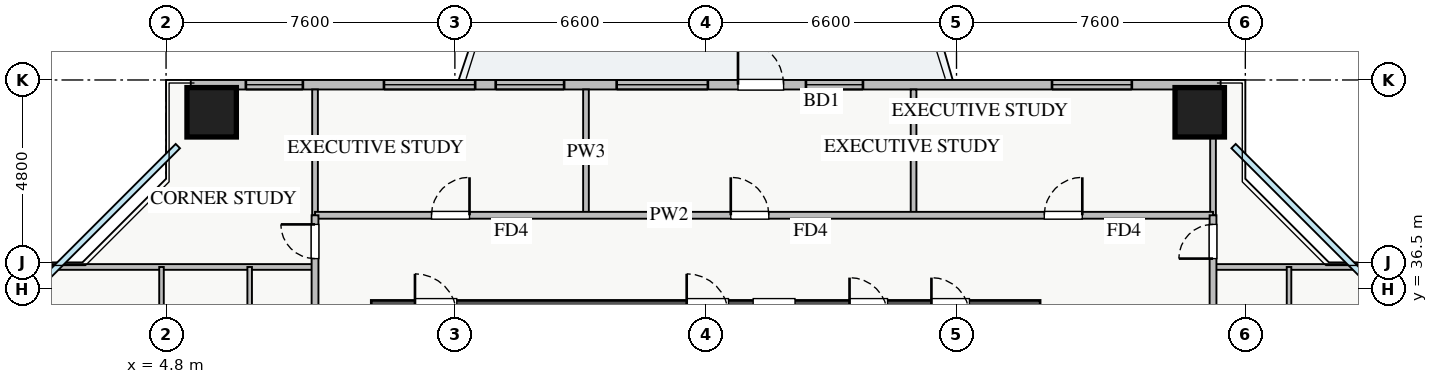
"""IFC4 building model, lengths in metres.
Left out: names, types, materials, properties, quantities, classifications, styles, units other than length and angle.
Written with IfcOpenShell. Run it as: python <this file> out.ifc"""

import sys

from ifc_helpers import new_model, si_unit, direction, frame, frame_2d, origin, origin_2d, place, context, subcontext, project, spatial, rectangle, extrude, source, transform, mapped, element, fill, save


model = new_model("IFC4")
c1 = context("Model", 3, precision=1e-05, world=origin(), true_north=direction((0.0, 1.0)))
c2 = subcontext(c1, "Body", "Model", "MODEL_VIEW")
j1 = project(units=[si_unit("LENGTHUNIT", "METRE"), si_unit("PLANEANGLEUNIT", "RADIAN")], contexts=[c1])
p1 = place(None, origin())
s1 = spatial("IfcSite", under=j1, at=p1, CompositionType="ELEMENT")
p2 = place(p1, origin())
s2 = spatial("IfcBuilding", under=s1, at=p2, CompositionType="ELEMENT")
p3 = place(p2, frame((0.0, 0.0, 86.0)))
s3 = spatial("IfcBuildingStorey", under=s2, at=p3, CompositionType="ELEMENT", Elevation=86.0)
p4 = place(p3, frame((10.2, 35.8, 0.0), z_axis=(0.0, 0.0, 1.0), x_axis=(1.0, 0.0, 0.0)))
e1 = element("IfcWall", 1, at=p4, inside=s3, PredefinedType="SHEAR", context=c2, shape_type="SweptSolid", body=[
    extrude(rectangle(XDim=17.6, YDim=0.8, at=frame_2d((8.8, 0.0))), origin(), (0.0, 0.0, 1.0), 3.25),
])
p5 = place(p4, frame((1.15, 0.0, 0.0)))
e2 = element("IfcOpeningElement", 2, at=p5, cuts=e1, PredefinedType="OPENING", context=c2, shape_type="SweptSolid", body=[
    extrude(rectangle(XDim=1.1, YDim=2.05, at=frame_2d((0.55, 1.025))), frame((0.0, 0.41, 0.0), z_axis=(0.0, -1.0, 0.0), x_axis=(1.0, 0.0, 0.0)), (0.0, 0.0, 1.0), 0.82),
])
p6 = place(p4, frame((8.3, 0.0, 0.0)))
e3 = element("IfcOpeningElement", 3, at=p6, cuts=e1, PredefinedType="OPENING", context=c2, shape_type="SweptSolid", body=[
    extrude(rectangle(XDim=1.1, YDim=2.05, at=frame_2d((0.55, 1.025))), frame((0.0, 0.41, 0.0), z_axis=(0.0, -1.0, 0.0), x_axis=(1.0, 0.0, 0.0)), (0.0, 0.0, 1.0), 0.82),
])
p7 = place(p4, frame((10.05, 0.0, 0.0)))
e4 = element("IfcOpeningElement", 4, at=p7, cuts=e1, PredefinedType="OPENING", context=c2, shape_type="SweptSolid", body=[
    extrude(rectangle(XDim=1.1, YDim=2.05, at=frame_2d((0.55, 1.025))), frame((0.0, 0.41, 0.0), z_axis=(0.0, -1.0, 0.0), x_axis=(1.0, 0.0, 0.0)), (0.0, 0.0, 1.0), 0.82),
])
p8 = place(p4, frame((14.74, 0.0, 0.0)))
e5 = element("IfcOpeningElement", 5, at=p8, cuts=e1, PredefinedType="OPENING", context=c2, shape_type="SweptSolid", body=[
    extrude(rectangle(XDim=1.0, YDim=2.05, at=frame_2d((0.5, 1.025))), frame((0.0, 0.41, 0.0), z_axis=(0.0, -1.0, 0.0), x_axis=(1.0, 0.0, 0.0)), (0.0, 0.0, 1.0), 0.82),
])
p9 = place(p4, frame((12.585, 0.0, 0.0)))
e6 = element("IfcOpeningElement", 6, at=p9, cuts=e1, PredefinedType="OPENING", context=c2, shape_type="SweptSolid", body=[
    extrude(rectangle(XDim=1.0, YDim=2.05, at=frame_2d((0.5, 1.025))), frame((0.0, 0.41, 0.0), z_axis=(0.0, -1.0, 0.0), x_axis=(1.0, 0.0, 0.0)), (0.0, 0.0, 1.0), 0.82),
])
m1 = source(origin(), c2, "Body", "SweptSolid", [
    extrude(rectangle(XDim=1.3, YDim=1.3, at=origin_2d()), origin(), (0.0, 0.0, 1.0), 3.25),
])
for number, where, z_axis, x_axis in (
    (7, (32.0, 41.15, 0.0), (0.0, 0.0, 1.0), (1.0, 0.0, 0.0)),
    (8, (6.0, 41.15, 0.0), (0.0, 0.0, 1.0), (1.0, 0.0, 0.0)),
):
    element("IfcColumn", number, at=place(p3, frame(where, z_axis=z_axis, x_axis=x_axis)), inside=s3, PredefinedType="COLUMN", context=c2, shape_type="MappedRepresentation", body=[
        mapped(m1, transform((0.0, 0.0, 0.0), x_axis=(1.0, 0.0, 0.0), y_axis=(0.0, 1.0, 0.0), z_axis=(0.0, 0.0, 1.0), scale=1.0)),
    ])
p10 = place(p3, frame((5.45, 41.875, 0.0), z_axis=(0.0, 0.0, 1.0), x_axis=(1.0, 0.0, 0.0)))
e9 = element("IfcWall", 9, at=p10, inside=s3, PredefinedType="STANDARD", context=c2, shape_type="SweptSolid", body=[
    extrude(rectangle(XDim=27.1, YDim=0.25, at=frame_2d((13.55, 0.0))), origin(), (0.0, 0.0, 1.0), 2.61),
])
p11 = place(p10, frame((14.4, 0.0, 0.0)))
e10 = element("IfcOpeningElement", 10, at=p11, cuts=e9, PredefinedType="OPENING", context=c2, shape_type="SweptSolid", body=[
    extrude(rectangle(XDim=1.2, YDim=2.1, at=frame_2d((0.6, 1.05))), frame((0.0, 0.135, 0.0), z_axis=(0.0, -1.0, 0.0), x_axis=(1.0, 0.0, 0.0)), (0.0, 0.0, 1.0), 0.27),
])
p12 = place(p10, frame((1.45, 0.0, 0.9)))
e11 = element("IfcOpeningElement", 11, at=p12, cuts=e9, PredefinedType="OPENING", context=c2, shape_type="SweptSolid", body=[
    extrude(rectangle(XDim=1.5, YDim=1.5, at=frame_2d((0.75, 0.75))), frame((0.0, 0.135, 0.0), z_axis=(0.0, -1.0, 0.0), x_axis=(1.0, 0.0, 0.0)), (0.0, 0.0, 1.0), 0.27),
])
p13 = place(p10, frame((8.024, 0.0, 0.9)))
e12 = element("IfcOpeningElement", 12, at=p13, cuts=e9, PredefinedType="OPENING", context=c2, shape_type="SweptSolid", body=[
    extrude(rectangle(XDim=1.8, YDim=1.5, at=frame_2d((0.9, 0.75))), frame((0.0, 0.135, 0.0), z_axis=(0.0, -1.0, 0.0), x_axis=(1.0, 0.0, 0.0)), (0.0, 0.0, 1.0), 0.27),
])
p14 = place(p10, frame((16.188, 0.0, 0.9)))
e13 = element("IfcOpeningElement", 13, at=p14, cuts=e9, PredefinedType="OPENING", context=c2, shape_type="SweptSolid", body=[
    extrude(rectangle(XDim=1.5, YDim=1.45, at=frame_2d((0.75, 0.725))), frame((0.0, 0.135, 0.0), z_axis=(0.0, -1.0, 0.0), x_axis=(1.0, 0.0, 0.0)), (0.0, 0.0, 1.0), 0.27),
])
p15 = place(p10, frame((22.663, 0.0, 0.9)))
e14 = element("IfcOpeningElement", 14, at=p15, cuts=e9, PredefinedType="OPENING", context=c2, shape_type="SweptSolid", body=[
    extrude(rectangle(XDim=2.1, YDim=1.48, at=frame_2d((1.05, 0.74))), frame((0.0, 0.135, 0.0), z_axis=(0.0, -1.0, 0.0), x_axis=(1.0, 0.0, 0.0)), (0.0, 0.0, 1.0), 0.27),
])
p16 = place(p10, frame((5.084, 0.0, 0.9)))
e15 = element("IfcOpeningElement", 15, at=p16, cuts=e9, PredefinedType="OPENING", context=c2, shape_type="SweptSolid", body=[
    extrude(rectangle(XDim=2.4, YDim=1.5, at=frame_2d((1.2, 0.75))), frame((0.0, 0.135, 0.0), z_axis=(0.0, -1.0, 0.0), x_axis=(1.0, 0.0, 0.0)), (0.0, 0.0, 1.0), 0.27),
])
p17 = place(p10, frame((11.208, 0.0, 0.9)))
e16 = element("IfcOpeningElement", 16, at=p17, cuts=e9, PredefinedType="OPENING", context=c2, shape_type="SweptSolid", body=[
    extrude(rectangle(XDim=2.4, YDim=1.5, at=frame_2d((1.2, 0.75))), frame((0.0, 0.135, 0.0), z_axis=(0.0, -1.0, 0.0), x_axis=(1.0, 0.0, 0.0)), (0.0, 0.0, 1.0), 0.27),
])
p18 = place(p3, frame((15.85, 38.44, 0.0), z_axis=(0.0, 0.0, 1.0), x_axis=(0.0, 1.0, 0.0)))
e17 = element("IfcWall", 17, at=p18, inside=s3, PredefinedType="PARTITIONING", context=c2, shape_type="SweptSolid", body=[
    extrude(rectangle(XDim=3.31, YDim=0.15, at=frame_2d((1.655, 0.0))), origin(), (0.0, 0.0, 1.0), 2.715),
])
for number, where, z_axis, x_axis in (
    (18, (24.47, 38.44, 0.0), (0.0, 0.0, 1.0), (0.0, 1.0, 0.0)),
    (19, (8.72, 38.44, 0.0), (0.0, 0.0, 1.0), (0.0, 1.0, 0.0)),
    (20, (32.35, 38.44, 0.0), (0.0, 0.0, 1.0), (0.0, 1.0, 0.0)),
):
    element("IfcWall", number, at=place(p3, frame(where, z_axis=z_axis, x_axis=x_axis)), inside=s3, PredefinedType="PARTITIONING", context=c2, shape_type="SweptSolid", body=[
        extrude(rectangle(XDim=3.31, YDim=0.15, at=frame_2d((1.655, 0.0))), origin(), (0.0, 0.0, 1.0), 3.07),
    ])
p19 = place(p3, frame((8.72, 38.44, 0.0), z_axis=(0.0, 0.0, 1.0), x_axis=(1.0, 0.0, 0.0)))
e21 = element("IfcWall", 21, at=p19, inside=s3, PredefinedType="PARTITIONING", context=c2, shape_type="SweptSolid", body=[
    extrude(rectangle(XDim=23.63, YDim=0.18, at=frame_2d((11.815, 0.0))), origin(), (0.0, 0.0, 1.0), 3.07),
])
p20 = place(p19, frame((3.065, 0.0, 0.0)))
e22 = element("IfcOpeningElement", 22, at=p20, cuts=e21, PredefinedType="OPENING", context=c2, shape_type="SweptSolid", body=[
    extrude(rectangle(XDim=1.0, YDim=2.05, at=frame_2d((0.5, 1.025))), frame((0.0, 0.1, 0.0), z_axis=(0.0, -1.0, 0.0), x_axis=(1.0, 0.0, 0.0)), (0.0, 0.0, 1.0), 0.2),
])
p21 = place(p19, frame((10.94, 0.0, 0.0)))
e23 = element("IfcOpeningElement", 23, at=p21, cuts=e21, PredefinedType="OPENING", context=c2, shape_type="SweptSolid", body=[
    extrude(rectangle(XDim=1.0, YDim=2.05, at=frame_2d((0.5, 1.025))), frame((0.0, 0.1, 0.0), z_axis=(0.0, -1.0, 0.0), x_axis=(1.0, 0.0, 0.0)), (0.0, 0.0, 1.0), 0.2),
])
p22 = place(p19, frame((19.19, 0.0, 0.0)))
e24 = element("IfcOpeningElement", 24, at=p22, cuts=e21, PredefinedType="OPENING", context=c2, shape_type="SweptSolid", body=[
    extrude(rectangle(XDim=1.0, YDim=2.05, at=frame_2d((0.5, 1.025))), frame((0.0, 0.1, 0.0), z_axis=(0.0, -1.0, 0.0), x_axis=(1.0, 0.0, 0.0)), (0.0, 0.0, 1.0), 0.2),
])
p23 = place(p3, frame((0.25, 37.08, 0.0), z_axis=(0.0, 0.0, 1.0), x_axis=(1.0, 0.0, 0.0)))
e25 = element("IfcWall", 25, at=p23, inside=s3, PredefinedType="PARTITIONING", context=c2, shape_type="SweptSolid", body=[
    extrude(rectangle(XDim=8.47, YDim=0.15, at=frame_2d((4.235, 0.0))), origin(), (0.0, 0.0, 1.0), 3.07),
])
for number, where, z_axis, x_axis in (
    (26, (4.68, 32.14, 0.0), (0.0, 0.0, 1.0), (0.0, 1.0, 0.0)),
    (27, (7.0, 32.14, 0.0), (0.0, 0.0, 1.0), (0.0, 1.0, 0.0)),
):
    element("IfcWall", number, at=place(p3, frame(where, z_axis=z_axis, x_axis=x_axis)), inside=s3, PredefinedType="PLUMBINGWALL", context=c2, shape_type="SweptSolid", body=[
        extrude(rectangle(XDim=4.94, YDim=0.12, at=frame_2d((2.47, 0.0))), origin(), (0.0, 0.0, 1.0), 3.07),
    ])
p24 = place(p3, frame((8.72, 7.21, 0.0), z_axis=(0.0, 0.0, 1.0), x_axis=(0.0, 1.0, 0.0)))
e28 = element("IfcWall", 28, at=p24, inside=s3, PredefinedType="PARTITIONING", context=c2, shape_type="SweptSolid", body=[
    extrude(rectangle(XDim=31.23, YDim=0.18, at=frame_2d((15.615, 0.0))), origin(), (0.0, 0.0, 1.0), 3.07),
])
p25 = place(p24, frame((30.09, 0.0, 0.0)))
e29 = element("IfcOpeningElement", 29, at=p25, cuts=e28, PredefinedType="OPENING", context=c2, shape_type="SweptSolid", body=[
    extrude(rectangle(XDim=0.9, YDim=2.05, at=frame_2d((0.45, 1.025))), frame((0.0, 0.1, 0.0), z_axis=(0.0, -1.0, 0.0), x_axis=(1.0, 0.0, 0.0)), (0.0, 0.0, 1.0), 0.2),
])
p26 = place(p24, frame((0.24, 0.0, 0.0)))
e30 = element("IfcOpeningElement", 30, at=p26, cuts=e28, PredefinedType="OPENING", context=c2, shape_type="SweptSolid", body=[
    extrude(rectangle(XDim=0.9, YDim=2.05, at=frame_2d((0.45, 1.025))), frame((0.0, 0.1, 0.0), z_axis=(0.0, -1.0, 0.0), x_axis=(1.0, 0.0, 0.0)), (0.0, 0.0, 1.0), 0.2),
])
p27 = place(p24, frame((3.07, 0.0, 0.0)))
e31 = element("IfcOpeningElement", 31, at=p27, cuts=e28, PredefinedType="OPENING", context=c2, shape_type="SweptSolid", body=[
    extrude(rectangle(XDim=1.0, YDim=2.05, at=frame_2d((0.5, 1.025))), frame((0.0, 0.1, 0.0), z_axis=(0.0, -1.0, 0.0), x_axis=(1.0, 0.0, 0.0)), (0.0, 0.0, 1.0), 0.2),
])
p28 = place(p24, frame((15.37, 0.0, 0.0)))
e32 = element("IfcOpeningElement", 32, at=p28, cuts=e28, PredefinedType="OPENING", context=c2, shape_type="SweptSolid", body=[
    extrude(rectangle(XDim=1.0, YDim=2.05, at=frame_2d((0.5, 1.025))), frame((0.0, 0.1, 0.0), z_axis=(0.0, -1.0, 0.0), x_axis=(1.0, 0.0, 0.0)), (0.0, 0.0, 1.0), 0.2),
])
p29 = place(p24, frame((21.96, 0.0, 0.0)))
e33 = element("IfcOpeningElement", 33, at=p29, cuts=e28, PredefinedType="OPENING", context=c2, shape_type="SweptSolid", body=[
    extrude(rectangle(XDim=1.0, YDim=2.05, at=frame_2d((0.5, 1.025))), frame((0.0, 0.1, 0.0), z_axis=(0.0, -1.0, 0.0), x_axis=(1.0, 0.0, 0.0)), (0.0, 0.0, 1.0), 0.2),
])
p30 = place(p3, frame((32.35, 37.08, 0.0), z_axis=(0.0, 0.0, 1.0), x_axis=(1.0, 0.0, 0.0)))
e34 = element("IfcWall", 34, at=p30, inside=s3, PredefinedType="PARTITIONING", context=c2, shape_type="SweptSolid", body=[
    extrude(rectangle(XDim=5.4, YDim=0.15, at=frame_2d((2.7, 0.0))), origin(), (0.0, 0.0, 1.0), 3.07),
])
p31 = place(p3, frame((34.35, 30.45, 0.0), z_axis=(0.0, 0.0, 1.0), x_axis=(0.0, 1.0, 0.0)))
e35 = element("IfcWall", 35, at=p31, inside=s3, PredefinedType="PLUMBINGWALL", context=c2, shape_type="SweptSolid", body=[
    extrude(rectangle(XDim=6.63, YDim=0.12, at=frame_2d((3.315, 0.0))), origin(), (0.0, 0.0, 1.0), 3.07),
])
p32 = place(p3, frame((32.35, 7.21, 0.0), z_axis=(0.0, 0.0, 1.0), x_axis=(0.0, 1.0, 0.0)))
e36 = element("IfcWall", 36, at=p32, inside=s3, PredefinedType="PARTITIONING", context=c2, shape_type="SweptSolid", body=[
    extrude(rectangle(XDim=31.23, YDim=0.18, at=frame_2d((15.615, 0.0))), origin(), (0.0, 0.0, 1.0), 2.715),
])
p33 = place(p32, frame((30.09, 0.0, 0.0)))
e37 = element("IfcOpeningElement", 37, at=p33, cuts=e36, PredefinedType="OPENING", context=c2, shape_type="SweptSolid", body=[
    extrude(rectangle(XDim=0.9, YDim=2.05, at=frame_2d((0.45, 1.025))), frame((0.0, 0.1, 0.0), z_axis=(0.0, -1.0, 0.0), x_axis=(1.0, 0.0, 0.0)), (0.0, 0.0, 1.0), 0.2),
])
p34 = place(p32, frame((0.415, 0.0, 0.0)))
e38 = element("IfcOpeningElement", 38, at=p34, cuts=e36, PredefinedType="OPENING", context=c2, shape_type="SweptSolid", body=[
    extrude(rectangle(XDim=0.9, YDim=2.05, at=frame_2d((0.45, 1.025))), frame((0.0, 0.1, 0.0), z_axis=(0.0, -1.0, 0.0), x_axis=(1.0, 0.0, 0.0)), (0.0, 0.0, 1.0), 0.2),
])
p35 = place(p32, frame((4.73, 0.0, 0.0)))
e39 = element("IfcOpeningElement", 39, at=p35, cuts=e36, PredefinedType="OPENING", context=c2, shape_type="SweptSolid", body=[
    extrude(rectangle(XDim=1.0, YDim=2.05, at=frame_2d((0.5, 1.025))), frame((0.0, 0.1, 0.0), z_axis=(0.0, -1.0, 0.0), x_axis=(1.0, 0.0, 0.0)), (0.0, 0.0, 1.0), 0.2),
])
p36 = place(p32, frame((18.655, 0.0, 0.0)))
e40 = element("IfcOpeningElement", 40, at=p36, cuts=e36, PredefinedType="OPENING", context=c2, shape_type="SweptSolid", body=[
    extrude(rectangle(XDim=1.0, YDim=2.05, at=frame_2d((0.5, 1.025))), frame((0.0, 0.1, 0.0), z_axis=(0.0, -1.0, 0.0), x_axis=(1.0, 0.0, 0.0)), (0.0, 0.0, 1.0), 0.2),
])
m2 = source(origin(), c2, "Body", "SweptSolid", [
    extrude(rectangle(XDim=1.2, YDim=2.1, at=frame_2d((0.6, 1.05))), frame((0.0, 0.025, 0.0), z_axis=(0.0, -1.0, 0.0), x_axis=(1.0, 0.0, 0.0)), (0.0, 0.0, 1.0), 0.05),
])
p37 = place(p11, origin())
e41 = element("IfcDoor", 41, at=p37, inside=s3, OperationType="SINGLE_SWING_LEFT", PredefinedType="DOOR", context=c2, shape_type="MappedRepresentation", body=[
    mapped(m2, transform((0.0, 0.0, 0.0), x_axis=(1.0, 0.0, 0.0), y_axis=(0.0, 1.0, 0.0), z_axis=(0.0, 0.0, 1.0), scale=1.0)),
])
fill(e10, e41)
m3 = source(origin(), c2, "Body", "SweptSolid", [
    extrude(rectangle(XDim=1.5, YDim=1.5, at=frame_2d((0.75, 0.75))), frame((0.0, 0.03, 0.0), z_axis=(0.0, -1.0, 0.0), x_axis=(1.0, 0.0, 0.0)), (0.0, 0.0, 1.0), 0.06),
])
p38 = place(p12, origin())
e42 = element("IfcWindow", 42, at=p38, inside=s3, PartitioningType="TRIPLE_PANEL_VERTICAL", PredefinedType="WINDOW", context=c2, shape_type="MappedRepresentation", body=[
    mapped(m3, transform((0.0, 0.0, 0.0), x_axis=(1.0, 0.0, 0.0), y_axis=(0.0, 1.0, 0.0), z_axis=(0.0, 0.0, 1.0), scale=1.0)),
])
fill(e11, e42)
m4 = source(origin(), c2, "Body", "SweptSolid", [
    extrude(rectangle(XDim=1.8, YDim=1.5, at=frame_2d((0.9, 0.75))), frame((0.0, 0.03, 0.0), z_axis=(0.0, -1.0, 0.0), x_axis=(1.0, 0.0, 0.0)), (0.0, 0.0, 1.0), 0.06),
])
p39 = place(p13, origin())
e43 = element("IfcWindow", 43, at=p39, inside=s3, PartitioningType="DOUBLE_PANEL_VERTICAL", PredefinedType="WINDOW", context=c2, shape_type="MappedRepresentation", body=[
    mapped(m4, transform((0.0, 0.0, 0.0), x_axis=(1.0, 0.0, 0.0), y_axis=(0.0, 1.0, 0.0), z_axis=(0.0, 0.0, 1.0), scale=1.0)),
])
fill(e12, e43)
m5 = source(origin(), c2, "Body", "SweptSolid", [
    extrude(rectangle(XDim=1.5, YDim=1.45, at=frame_2d((0.75, 0.725))), frame((0.0, 0.03, 0.0), z_axis=(0.0, -1.0, 0.0), x_axis=(1.0, 0.0, 0.0)), (0.0, 0.0, 1.0), 0.06),
])
p40 = place(p14, origin())
e44 = element("IfcWindow", 44, at=p40, inside=s3, PartitioningType="DOUBLE_PANEL_VERTICAL", PredefinedType="WINDOW", context=c2, shape_type="MappedRepresentation", body=[
    mapped(m5, transform((0.0, 0.0, 0.0), x_axis=(1.0, 0.0, 0.0), y_axis=(0.0, 1.0, 0.0), z_axis=(0.0, 0.0, 1.0), scale=1.0)),
])
fill(e13, e44)
m6 = source(origin(), c2, "Body", "SweptSolid", [
    extrude(rectangle(XDim=2.1, YDim=1.48, at=frame_2d((1.05, 0.74))), frame((0.0, 0.03, 0.0), z_axis=(0.0, -1.0, 0.0), x_axis=(1.0, 0.0, 0.0)), (0.0, 0.0, 1.0), 0.06),
])
p41 = place(p15, origin())
e45 = element("IfcWindow", 45, at=p41, inside=s3, PartitioningType="TRIPLE_PANEL_VERTICAL", PredefinedType="WINDOW", context=c2, shape_type="MappedRepresentation", body=[
    mapped(m6, transform((0.0, 0.0, 0.0), x_axis=(1.0, 0.0, 0.0), y_axis=(0.0, 1.0, 0.0), z_axis=(0.0, 0.0, 1.0), scale=1.0)),
])
fill(e14, e45)
m7 = source(origin(), c2, "Body", "SweptSolid", [
    extrude(rectangle(XDim=1.0, YDim=2.05, at=frame_2d((0.5, 1.025))), frame((0.0, 0.025, 0.0), z_axis=(0.0, -1.0, 0.0), x_axis=(1.0, 0.0, 0.0)), (0.0, 0.0, 1.0), 0.05),
])
p42 = place(p20, origin())
e46 = element("IfcDoor", 46, at=p42, inside=s3, OperationType="SINGLE_SWING_RIGHT", PredefinedType="DOOR", context=c2, shape_type="MappedRepresentation", body=[
    mapped(m7, transform((0.0, 0.0, 0.0), x_axis=(1.0, 0.0, 0.0), y_axis=(0.0, 1.0, 0.0), z_axis=(0.0, 0.0, 1.0), scale=1.0)),
])
fill(e22, e46)
p43 = place(p21, origin())
e47 = element("IfcDoor", 47, at=p43, inside=s3, OperationType="SINGLE_SWING_LEFT", PredefinedType="DOOR", context=c2, shape_type="MappedRepresentation", body=[
    mapped(m7, transform((0.0, 0.0, 0.0), x_axis=(1.0, 0.0, 0.0), y_axis=(0.0, 1.0, 0.0), z_axis=(0.0, 0.0, 1.0), scale=1.0)),
])
fill(e23, e47)
p44 = place(p22, origin())
e48 = element("IfcDoor", 48, at=p44, inside=s3, OperationType="SINGLE_SWING_RIGHT", PredefinedType="DOOR", context=c2, shape_type="MappedRepresentation", body=[
    mapped(m7, transform((0.0, 0.0, 0.0), x_axis=(1.0, 0.0, 0.0), y_axis=(0.0, 1.0, 0.0), z_axis=(0.0, 0.0, 1.0), scale=1.0)),
])
fill(e24, e48)
m8 = source(origin(), c2, "Body", "SweptSolid", [
    extrude(rectangle(XDim=0.9, YDim=2.05, at=frame_2d((0.45, 1.025))), frame((0.0, 0.025, 0.0), z_axis=(0.0, -1.0, 0.0), x_axis=(1.0, 0.0, 0.0)), (0.0, 0.0, 1.0), 0.05),
])
p45 = place(p25, origin())
e49 = element("IfcDoor", 49, at=p45, inside=s3, OperationType="SINGLE_SWING_RIGHT", PredefinedType="DOOR", context=c2, shape_type="MappedRepresentation", body=[
    mapped(m8, transform((0.0, 0.0, 0.0), x_axis=(1.0, 0.0, 0.0), y_axis=(0.0, 1.0, 0.0), z_axis=(0.0, 0.0, 1.0), scale=1.0)),
])
fill(e29, e49)
p46 = place(p33, origin())
e50 = element("IfcDoor", 50, at=p46, inside=s3, OperationType="SINGLE_SWING_LEFT", PredefinedType="DOOR", context=c2, shape_type="MappedRepresentation", body=[
    mapped(m8, transform((0.0, 0.0, 0.0), x_axis=(1.0, 0.0, 0.0), y_axis=(0.0, 1.0, 0.0), z_axis=(0.0, 0.0, 1.0), scale=1.0)),
])
fill(e37, e50)
m9 = source(origin(), c2, "Body", "SweptSolid", [
    extrude(rectangle(XDim=2.4, YDim=1.5, at=frame_2d((1.2, 0.75))), frame((0.0, 0.03, 0.0), z_axis=(0.0, -1.0, 0.0), x_axis=(1.0, 0.0, 0.0)), (0.0, 0.0, 1.0), 0.06),
])
p47 = place(p16, origin())
e51 = element("IfcWindow", 51, at=p47, inside=s3, PartitioningType="TRIPLE_PANEL_VERTICAL", PredefinedType="WINDOW", context=c2, shape_type="MappedRepresentation", body=[
    mapped(m9, transform((0.0, 0.0, 0.0), x_axis=(1.0, 0.0, 0.0), y_axis=(0.0, 1.0, 0.0), z_axis=(0.0, 0.0, 1.0), scale=1.0)),
])
fill(e15, e51)
p48 = place(p17, origin())
e52 = element("IfcWindow", 52, at=p48, inside=s3, PartitioningType="TRIPLE_PANEL_VERTICAL", PredefinedType="WINDOW", context=c2, shape_type="MappedRepresentation", body=[
    mapped(m9, transform((0.0, 0.0, 0.0), x_axis=(1.0, 0.0, 0.0), y_axis=(0.0, 1.0, 0.0), z_axis=(0.0, 0.0, 1.0), scale=1.0)),
])
fill(e16, e52)
save(model, sys.argv[1])
